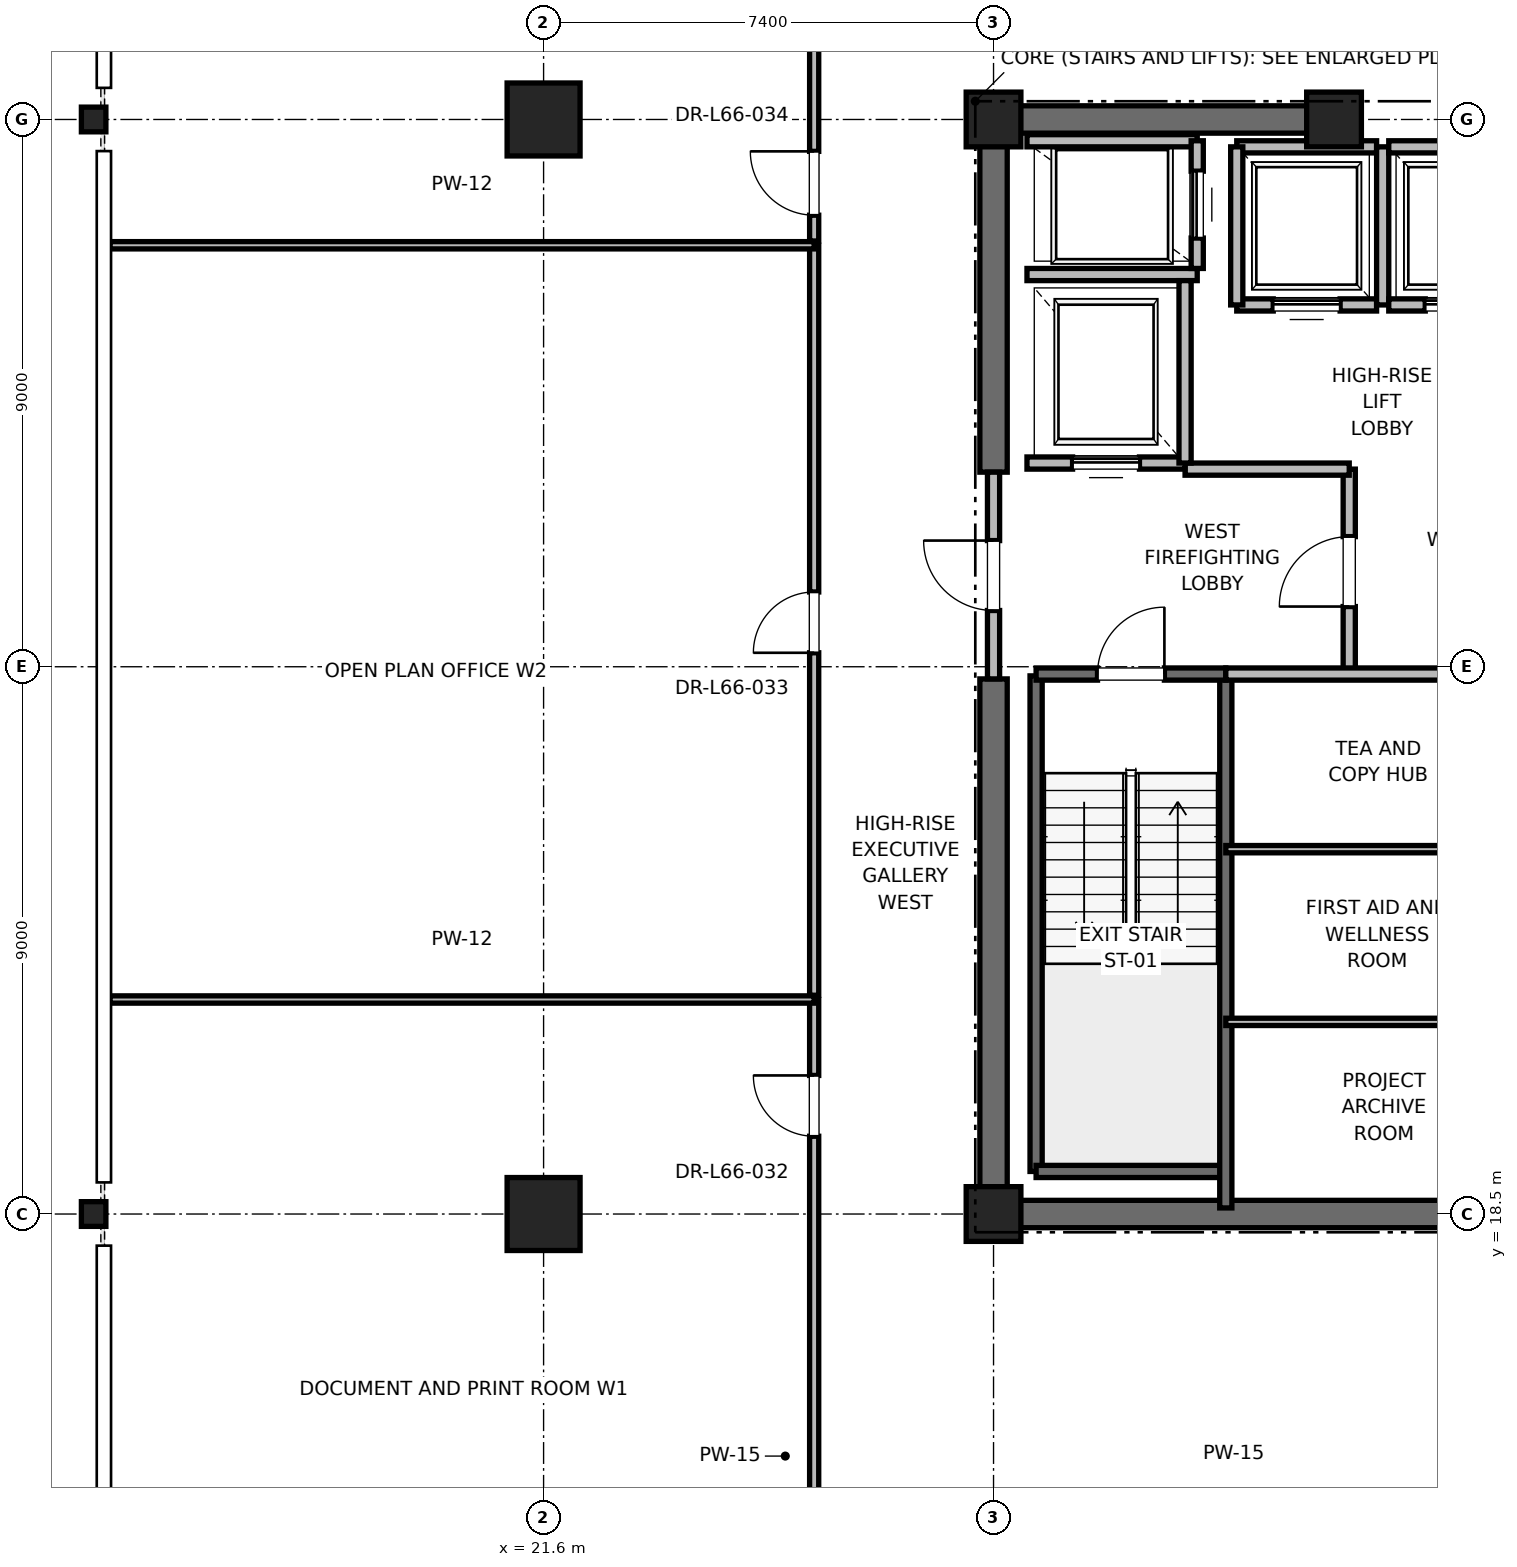
"""IFC4 building model, lengths in metres.
Left out: names, types, materials, properties, quantities, classifications, styles, units other than length and angle.
Written with IfcOpenShell. Run it as: python <this file> out.ifc"""

import sys

from ifc_helpers import new_model, si_unit, direction, frame, frame_2d, origin, origin_2d, place, context, subcontext, project, spatial, rectangle, i_section, extrude, element, fill, save


model = new_model("IFC4")
c1 = context("Model", 3, precision=1e-05, world=origin(), true_north=direction((0.0, 1.0)))
c2 = subcontext(c1, "Body", "Model", "MODEL_VIEW")
j1 = project(units=[si_unit("LENGTHUNIT", "METRE"), si_unit("PLANEANGLEUNIT", "RADIAN")], contexts=[c1])
p1 = place(None, origin())
s1 = spatial("IfcSite", under=j1, at=p1, CompositionType="ELEMENT")
p2 = place(p1, origin())
s2 = spatial("IfcBuilding", under=s1, at=p2, CompositionType="ELEMENT")
p3 = place(p2, frame((0.0, 0.0, 283.2)))
s3 = spatial("IfcBuildingStorey", under=s2, at=p3, CompositionType="ELEMENT", Elevation=283.2)
for number, where, z_axis, x_axis in (
    (1, (21.6, 18.5, 0.0), (0.0, 0.0, 1.0), (1.0, 0.0, 0.0)),
    (2, (21.6, 36.5, 0.0), (0.0, 0.0, 1.0), (1.0, 0.0, 0.0)),
):
    element("IfcColumn", number, at=place(p3, frame(where, z_axis=z_axis, x_axis=x_axis)), inside=s3, PredefinedType="COLUMN", context=c2, shape_type="SweptSolid", body=[
        extrude(rectangle(XDim=1.2, YDim=1.2, at=origin_2d()), origin(), (0.0, 0.0, 1.0), 4.0),
    ])
for number, where, z_axis, x_axis in (
    (3, (14.2, 18.5, 0.0), (0.0, 0.0, 1.0), (1.0, 0.0, 0.0)),
    (4, (14.2, 36.5, 0.0), (0.0, 0.0, 1.0), (1.0, 0.0, 0.0)),
):
    element("IfcColumn", number, at=place(p3, frame(where, z_axis=z_axis, x_axis=x_axis)), inside=s3, PredefinedType="COLUMN", context=c2, shape_type="SweptSolid", body=[
        extrude(i_section(OverallWidth=0.403, OverallDepth=0.406, WebThickness=0.027, FlangeThickness=0.043, FilletRadius=0.015, at=origin_2d()), origin(), (0.0, 0.0, 1.0), 4.0),
    ])
for number, where, z_axis, x_axis in (
    (5, (29.0, 18.5, 0.0), (0.0, 0.0, 1.0), (1.0, 0.0, 0.0)),
    (6, (29.0, 36.5, 0.0), (0.0, 0.0, 1.0), (1.0, 0.0, 0.0)),
    (7, (34.6, 36.5, 0.0), (0.0, 0.0, 1.0), (1.0, 0.0, 0.0)),
):
    element("IfcColumn", number, at=place(p3, frame(where, z_axis=z_axis, x_axis=x_axis)), inside=s3, PredefinedType="PILASTER", context=c2, shape_type="SweptSolid", body=[
        extrude(rectangle(XDim=0.9, YDim=0.9, at=origin_2d()), origin(), (0.0, 0.0, 1.0), 4.0),
    ])
p4 = place(p3, frame((29.0, 18.5, 0.0), z_axis=(0.0, 0.0, 1.0), x_axis=(1.0, 0.0, 0.0)))
e8 = element("IfcWall", 8, at=p4, inside=s3, PredefinedType="SHEAR", context=c2, shape_type="SweptSolid", body=[
    extrude(rectangle(XDim=9.2, YDim=0.45, at=frame_2d((4.6, 0.0))), origin(), (0.0, 0.0, 1.0), 3.785),
])
p5 = place(p3, frame((29.0, 36.5, 0.0), z_axis=(0.0, 0.0, 1.0), x_axis=(1.0, 0.0, 0.0)))
e9 = element("IfcWall", 9, at=p5, inside=s3, PredefinedType="SHEAR", context=c2, shape_type="SweptSolid", body=[
    extrude(rectangle(XDim=5.8, YDim=0.45, at=frame_2d((2.9, 0.0))), origin(), (0.0, 0.0, 1.0), 3.785),
])
p6 = place(p3, frame((29.0, 18.5, 0.0), z_axis=(0.0, 0.0, 1.0), x_axis=(0.0, 1.0, 0.0)))
e10 = element("IfcWall", 10, at=p6, inside=s3, PredefinedType="SHEAR", context=c2, shape_type="SweptSolid", body=[
    extrude(rectangle(XDim=8.8, YDim=0.45, at=frame_2d((4.4, 0.0))), origin(), (0.0, 0.0, 1.0), 3.785),
])
p7 = place(p3, frame((29.0, 30.7, 0.0), z_axis=(0.0, 0.0, 1.0), x_axis=(0.0, 1.0, 0.0)))
e11 = element("IfcWall", 11, at=p7, inside=s3, PredefinedType="SHEAR", context=c2, shape_type="SweptSolid", body=[
    extrude(rectangle(XDim=5.8, YDim=0.45, at=frame_2d((2.9, 0.0))), origin(), (0.0, 0.0, 1.0), 3.785),
])
p8 = place(p3, frame((29.7, 19.2, 0.0), z_axis=(0.0, 0.0, 1.0), x_axis=(0.0, 1.0, 0.0)))
e12 = element("IfcWall", 12, at=p8, inside=s3, PredefinedType="SOLIDWALL", context=c2, shape_type="SweptSolid", body=[
    extrude(rectangle(XDim=8.15, YDim=0.2, at=frame_2d((4.075, 0.0))), origin(), (0.0, 0.0, 1.0), 3.785),
])
p9 = place(p3, frame((29.7, 19.2, 0.0), z_axis=(0.0, 0.0, 1.0), x_axis=(1.0, 0.0, 0.0)))
e13 = element("IfcWall", 13, at=p9, inside=s3, PredefinedType="SOLIDWALL", context=c2, shape_type="SweptSolid", body=[
    extrude(rectangle(XDim=3.12, YDim=0.2, at=frame_2d((1.56, 0.0))), origin(), (0.0, 0.0, 1.0), 3.785),
])
p10 = place(p3, frame((32.82, 18.6, 0.0), z_axis=(0.0, 0.0, 1.0), x_axis=(0.0, 1.0, 0.0)))
e14 = element("IfcWall", 14, at=p10, inside=s3, PredefinedType="SOLIDWALL", context=c2, shape_type="SweptSolid", body=[
    extrude(rectangle(XDim=8.78, YDim=0.2, at=frame_2d((4.39, 0.0))), origin(), (0.0, 0.0, 1.0), 3.785),
])
p11 = place(p3, frame((29.7, 27.38, 0.0), z_axis=(0.0, 0.0, 1.0), x_axis=(1.0, 0.0, 0.0)))
e15 = element("IfcWall", 15, at=p11, inside=s3, PredefinedType="SOLIDWALL", context=c2, shape_type="SweptSolid", body=[
    extrude(rectangle(XDim=3.12, YDim=0.2, at=frame_2d((1.56, 0.0))), origin(), (0.0, 0.0, 1.0), 3.785),
])
p12 = place(p11, frame((1.01, 0.0, 0.0)))
e16 = element("IfcOpeningElement", 16, at=p12, cuts=e15, PredefinedType="OPENING", context=c2, shape_type="SweptSolid", body=[
    extrude(rectangle(XDim=1.1, YDim=2.15, at=frame_2d((0.55, 1.075))), frame((0.0, 0.1, 0.0), z_axis=(0.0, -1.0, 0.0), x_axis=(1.0, 0.0, 0.0)), (0.0, 0.0, 1.0), 0.2),
])
p13 = place(p3, frame((34.85, 27.38, 0.0), z_axis=(0.0, 0.0, 1.0), x_axis=(0.0, 1.0, 0.0)))
e17 = element("IfcWall", 17, at=p13, inside=s3, PredefinedType="PARTITIONING", context=c2, shape_type="SweptSolid", body=[
    extrude(rectangle(XDim=3.37, YDim=0.2, at=frame_2d((1.685, 0.0))), origin(), (0.0, 0.0, 1.0), 3.785),
])
p14 = place(p13, frame((1.11, 0.0, 0.0)))
e18 = element("IfcOpeningElement", 18, at=p14, cuts=e17, PredefinedType="OPENING", context=c2, shape_type="SweptSolid", body=[
    extrude(rectangle(XDim=1.15, YDim=2.2, at=frame_2d((0.575, 1.1))), frame((0.0, 0.1, 0.0), z_axis=(0.0, -1.0, 0.0), x_axis=(1.0, 0.0, 0.0)), (0.0, 0.0, 1.0), 0.2),
])
p15 = place(p3, frame((29.0, 27.3, 0.0), z_axis=(0.0, 0.0, 1.0), x_axis=(0.0, 1.0, 0.0)))
e19 = element("IfcWall", 19, at=p15, inside=s3, PredefinedType="PARTITIONING", context=c2, shape_type="SweptSolid", body=[
    extrude(rectangle(XDim=3.4, YDim=0.2, at=frame_2d((1.7, 0.0))), origin(), (0.0, 0.0, 1.0), 2.865),
])
p16 = place(p15, frame((1.125, 0.0, 0.0)))
e20 = element("IfcOpeningElement", 20, at=p16, cuts=e19, PredefinedType="OPENING", context=c2, shape_type="SweptSolid", body=[
    extrude(rectangle(XDim=1.15, YDim=2.2, at=frame_2d((0.575, 1.1))), frame((0.0, 0.1, 0.0), z_axis=(0.0, -1.0, 0.0), x_axis=(1.0, 0.0, 0.0)), (0.0, 0.0, 1.0), 0.2),
])
p17 = place(p3, frame((32.82, 27.38, 0.0), z_axis=(0.0, 0.0, 1.0), x_axis=(1.0, 0.0, 0.0)))
e21 = element("IfcWall", 21, at=p17, inside=s3, PredefinedType="PARTITIONING", context=c2, shape_type="SweptSolid", body=[
    extrude(rectangle(XDim=5.62, YDim=0.2, at=frame_2d((2.81, 0.0))), origin(), (0.0, 0.0, 1.0), 3.785),
])
p18 = place(p3, frame((32.15, 30.75, 0.0), z_axis=(0.0, 0.0, 1.0), x_axis=(1.0, 0.0, 0.0)))
e22 = element("IfcWall", 22, at=p18, inside=s3, PredefinedType="PARTITIONING", context=c2, shape_type="SweptSolid", body=[
    extrude(rectangle(XDim=2.7, YDim=0.2, at=frame_2d((1.35, 0.0))), origin(), (0.0, 0.0, 1.0), 3.785),
])
p19 = place(p3, frame((29.55, 30.85, 0.0), z_axis=(0.0, 0.0, 1.0), x_axis=(1.0, 0.0, 0.0)))
e23 = element("IfcWall", 23, at=p19, inside=s3, PredefinedType="SOLIDWALL", context=c2, shape_type="SweptSolid", body=[
    extrude(rectangle(XDim=2.6, YDim=0.2, at=frame_2d((1.3, 0.0))), origin(), (0.0, 0.0, 1.0), 2.865),
])
p20 = place(p19, frame((0.75, 0.0, 0.0)))
e24 = element("IfcOpeningElement", 24, at=p20, cuts=e23, PredefinedType="OPENING", context=c2, shape_type="SweptSolid", body=[
    extrude(rectangle(XDim=1.1, YDim=2.2, at=frame_2d((0.55, 1.1))), frame((0.0, 0.1, 0.0), z_axis=(0.0, -1.0, 0.0), x_axis=(1.0, 0.0, 0.0)), (0.0, 0.0, 1.0), 0.2),
])
p21 = place(p3, frame((29.55, 33.95, 0.0), z_axis=(0.0, 0.0, 1.0), x_axis=(1.0, 0.0, 0.0)))
e25 = element("IfcWall", 25, at=p21, inside=s3, PredefinedType="SOLIDWALL", context=c2, shape_type="SweptSolid", body=[
    extrude(rectangle(XDim=2.8, YDim=0.2, at=frame_2d((1.4, 0.0))), origin(), (0.0, 0.0, 1.0), 3.785),
])
p22 = place(p3, frame((32.15, 30.85, 0.0), z_axis=(0.0, 0.0, 1.0), x_axis=(0.0, 1.0, 0.0)))
e26 = element("IfcWall", 26, at=p22, inside=s3, PredefinedType="SOLIDWALL", context=c2, shape_type="SweptSolid", body=[
    extrude(rectangle(XDim=3.0, YDim=0.2, at=frame_2d((1.5, 0.0))), origin(), (0.0, 0.0, 1.0), 3.785),
])
p23 = place(p3, frame((32.35, 36.15, 0.0), z_axis=(0.0, 0.0, 1.0), x_axis=(-1.0, 0.0, 0.0)))
e27 = element("IfcWall", 27, at=p23, inside=s3, PredefinedType="SOLIDWALL", context=c2, shape_type="SweptSolid", body=[
    extrude(rectangle(XDim=2.8, YDim=0.2, at=frame_2d((1.4, 0.0))), origin(), (0.0, 0.0, 1.0), 3.148),
])
p24 = place(p3, frame((32.35, 34.05, 0.0), z_axis=(0.0, 0.0, 1.0), x_axis=(0.0, 1.0, 0.0)))
e28 = element("IfcWall", 28, at=p24, inside=s3, PredefinedType="SOLIDWALL", context=c2, shape_type="SweptSolid", body=[
    extrude(rectangle(XDim=2.1, YDim=0.2, at=frame_2d((1.05, 0.0))), origin(), (0.0, 0.0, 1.0), 3.785),
])
p25 = place(p24, frame((0.5, 0.0, 0.0)))
e29 = element("IfcOpeningElement", 29, at=p25, cuts=e28, PredefinedType="OPENING", context=c2, shape_type="SweptSolid", body=[
    extrude(rectangle(XDim=1.1, YDim=2.2, at=frame_2d((0.55, 1.1))), frame((0.0, 0.1, 0.0), z_axis=(0.0, -1.0, 0.0), x_axis=(1.0, 0.0, 0.0)), (0.0, 0.0, 1.0), 0.2),
])
p26 = place(p3, frame((33.0, 33.45, 0.0), z_axis=(0.0, 0.0, 1.0), x_axis=(1.0, 0.0, 0.0)))
e30 = element("IfcWall", 30, at=p26, inside=s3, PredefinedType="SOLIDWALL", context=c2, shape_type="SweptSolid", body=[
    extrude(rectangle(XDim=2.3, YDim=0.2, at=frame_2d((1.15, 0.0))), origin(), (0.0, 0.0, 1.0), 3.785),
])
p27 = place(p26, frame((0.6, 0.0, 0.0)))
e31 = element("IfcOpeningElement", 31, at=p27, cuts=e30, PredefinedType="OPENING", context=c2, shape_type="SweptSolid", body=[
    extrude(rectangle(XDim=1.1, YDim=2.2, at=frame_2d((0.55, 1.1))), frame((0.0, 0.1, 0.0), z_axis=(0.0, -1.0, 0.0), x_axis=(1.0, 0.0, 0.0)), (0.0, 0.0, 1.0), 0.2),
])
p28 = place(p3, frame((35.3, 36.05, 0.0), z_axis=(0.0, 0.0, 1.0), x_axis=(-1.0, 0.0, 0.0)))
e32 = element("IfcWall", 32, at=p28, inside=s3, PredefinedType="SOLIDWALL", context=c2, shape_type="SweptSolid", body=[
    extrude(rectangle(XDim=2.3, YDim=0.2, at=frame_2d((1.15, 0.0))), origin(), (0.0, 0.0, 1.0), 2.865),
])
p29 = place(p3, frame((33.0, 36.05, 0.0), z_axis=(0.0, 0.0, 1.0), x_axis=(0.0, -1.0, 0.0)))
e33 = element("IfcWall", 33, at=p29, inside=s3, PredefinedType="SOLIDWALL", context=c2, shape_type="SweptSolid", body=[
    extrude(rectangle(XDim=2.6, YDim=0.2, at=frame_2d((1.3, 0.0))), origin(), (0.0, 0.0, 1.0), 3.785),
])
p30 = place(p3, frame((35.4, 33.45, 0.0), z_axis=(0.0, 0.0, 1.0), x_axis=(0.0, 1.0, 0.0)))
e34 = element("IfcWall", 34, at=p30, inside=s3, PredefinedType="SOLIDWALL", context=c2, shape_type="SweptSolid", body=[
    extrude(rectangle(XDim=2.6, YDim=0.2, at=frame_2d((1.3, 0.0))), origin(), (0.0, 0.0, 1.0), 2.865),
])
p31 = place(p3, frame((35.5, 33.45, 0.0), z_axis=(0.0, 0.0, 1.0), x_axis=(1.0, 0.0, 0.0)))
e35 = element("IfcWall", 35, at=p31, inside=s3, PredefinedType="SOLIDWALL", context=c2, shape_type="SweptSolid", body=[
    extrude(rectangle(XDim=2.3, YDim=0.2, at=frame_2d((1.15, 0.0))), origin(), (0.0, 0.0, 1.0), 3.785),
])
p32 = place(p31, frame((0.6, 0.0, 0.0)))
e36 = element("IfcOpeningElement", 36, at=p32, cuts=e35, PredefinedType="OPENING", context=c2, shape_type="SweptSolid", body=[
    extrude(rectangle(XDim=1.1, YDim=2.2, at=frame_2d((0.55, 1.1))), frame((0.0, 0.1, 0.0), z_axis=(0.0, -1.0, 0.0), x_axis=(1.0, 0.0, 0.0)), (0.0, 0.0, 1.0), 0.2),
])
p33 = place(p3, frame((37.8, 36.05, 0.0), z_axis=(0.0, 0.0, 1.0), x_axis=(-1.0, 0.0, 0.0)))
e37 = element("IfcWall", 37, at=p33, inside=s3, PredefinedType="SOLIDWALL", context=c2, shape_type="SweptSolid", body=[
    extrude(rectangle(XDim=2.3, YDim=0.2, at=frame_2d((1.15, 0.0))), origin(), (0.0, 0.0, 1.0), 2.865),
])
for number, where, z_axis, x_axis in (
    (38, (32.82, 21.66, 0.0), (0.0, 0.0, 1.0), (1.0, 0.0, 0.0)),
    (39, (32.82, 24.5, 0.0), (0.0, 0.0, 1.0), (1.0, 0.0, 0.0)),
):
    element("IfcWall", number, at=place(p3, frame(where, z_axis=z_axis, x_axis=x_axis)), inside=s3, PredefinedType="PARTITIONING", context=c2, shape_type="SweptSolid", body=[
        extrude(rectangle(XDim=5.23, YDim=0.12, at=frame_2d((2.615, 0.0))), origin(), (0.0, 0.0, 1.0), 2.85),
    ])
p34 = place(p3, frame((26.05, 9.26, 0.0), z_axis=(0.0, 0.0, 1.0), x_axis=(0.0, 1.0, 0.0)))
e40 = element("IfcWall", 40, at=p34, inside=s3, PredefinedType="PARTITIONING", context=c2, shape_type="SweptSolid", body=[
    extrude(rectangle(XDim=12.768, YDim=0.15, at=frame_2d((6.384, 0.0))), origin(), (0.0, 0.0, 1.0), 2.85),
])
p35 = place(p34, frame((10.519, 0.0, 0.0)))
e41 = element("IfcOpeningElement", 41, at=p35, cuts=e40, PredefinedType="OPENING", context=c2, shape_type="SweptSolid", body=[
    extrude(rectangle(XDim=1.0, YDim=2.15, at=frame_2d((0.5, 1.075))), frame((0.0, 0.075, 0.0), z_axis=(0.0, -1.0, 0.0), x_axis=(1.0, 0.0, 0.0)), (0.0, 0.0, 1.0), 0.15),
])
p36 = place(p3, frame((14.469, 22.028, 0.0), z_axis=(0.0, 0.0, 1.0), x_axis=(1.0, 0.0, 0.0)))
e42 = element("IfcWall", 42, at=p36, inside=s3, PredefinedType="PARTITIONING", context=c2, shape_type="SweptSolid", body=[
    extrude(rectangle(XDim=11.581, YDim=0.12, at=frame_2d((5.791, 0.0))), origin(), (0.0, 0.0, 1.0), 2.85),
])
p37 = place(p3, frame((26.05, 22.098, 0.0), z_axis=(0.0, 0.0, 1.0), x_axis=(0.0, 1.0, 0.0)))
e43 = element("IfcWall", 43, at=p37, inside=s3, PredefinedType="PARTITIONING", context=c2, shape_type="SweptSolid", body=[
    extrude(rectangle(XDim=12.333, YDim=0.15, at=frame_2d((6.167, 0.0))), origin(), (0.0, 0.0, 1.0), 2.85),
])
p38 = place(p37, frame((5.632, 0.0, 0.0)))
e44 = element("IfcOpeningElement", 44, at=p38, cuts=e43, PredefinedType="OPENING", context=c2, shape_type="SweptSolid", body=[
    extrude(rectangle(XDim=1.0, YDim=2.15, at=frame_2d((0.5, 1.075))), frame((0.0, 0.075, 0.0), z_axis=(0.0, -1.0, 0.0), x_axis=(1.0, 0.0, 0.0)), (0.0, 0.0, 1.0), 0.15),
])
p39 = place(p3, frame((14.469, 34.431, 0.0), z_axis=(0.0, 0.0, 1.0), x_axis=(1.0, 0.0, 0.0)))
e45 = element("IfcWall", 45, at=p39, inside=s3, PredefinedType="PARTITIONING", context=c2, shape_type="SweptSolid", body=[
    extrude(rectangle(XDim=11.581, YDim=0.12, at=frame_2d((5.791, 0.0))), origin(), (0.0, 0.0, 1.0), 2.85),
])
p40 = place(p3, frame((26.05, 34.501, 0.0), z_axis=(0.0, 0.0, 1.0), x_axis=(0.0, 1.0, 0.0)))
e46 = element("IfcWall", 46, at=p40, inside=s3, PredefinedType="PARTITIONING", context=c2, shape_type="SweptSolid", body=[
    extrude(rectangle(XDim=11.239, YDim=0.15, at=frame_2d((5.62, 0.0))), origin(), (0.0, 0.0, 1.0), 2.85),
])
p41 = place(p40, frame((0.424, 0.0, 0.0)))
e47 = element("IfcOpeningElement", 47, at=p41, cuts=e46, PredefinedType="OPENING", context=c2, shape_type="SweptSolid", body=[
    extrude(rectangle(XDim=1.05, YDim=2.2, at=frame_2d((0.525, 1.1))), frame((0.0, 0.075, 0.0), z_axis=(0.0, -1.0, 0.0), x_axis=(1.0, 0.0, 0.0)), (0.0, 0.0, 1.0), 0.15),
])
p42 = place(p12, origin())
e48 = element("IfcDoor", 48, at=p42, inside=s3, OperationType="SINGLE_SWING_RIGHT", PredefinedType="DOOR", context=c2, shape_type="SweptSolid", body=[
    extrude(rectangle(XDim=1.1, YDim=2.15, at=frame_2d((0.55, 1.075))), frame((0.0, 0.025, 0.0), z_axis=(0.0, -1.0, 0.0), x_axis=(1.0, 0.0, 0.0)), (0.0, 0.0, 1.0), 0.05),
])
fill(e16, e48)
p43 = place(p14, origin())
e49 = element("IfcDoor", 49, at=p43, inside=s3, OperationType="SINGLE_SWING_LEFT", PredefinedType="DOOR", context=c2, shape_type="SweptSolid", body=[
    extrude(rectangle(XDim=1.15, YDim=2.2, at=frame_2d((0.575, 1.1))), frame((0.0, 0.025, 0.0), z_axis=(0.0, -1.0, 0.0), x_axis=(1.0, 0.0, 0.0)), (0.0, 0.0, 1.0), 0.05),
])
fill(e18, e49)
p44 = place(p16, origin())
e50 = element("IfcDoor", 50, at=p44, inside=s3, OperationType="SINGLE_SWING_RIGHT", PredefinedType="DOOR", context=c2, shape_type="SweptSolid", body=[
    extrude(rectangle(XDim=1.15, YDim=2.2, at=frame_2d((0.575, 1.1))), frame((0.0, 0.025, 0.0), z_axis=(0.0, -1.0, 0.0), x_axis=(1.0, 0.0, 0.0)), (0.0, 0.0, 1.0), 0.05),
])
fill(e20, e50)
p45 = place(p20, origin())
e51 = element("IfcDoor", 51, at=p45, inside=s3, OperationType="SLIDING_TO_RIGHT", PredefinedType="DOOR", context=c2, shape_type="SweptSolid", body=[
    extrude(rectangle(XDim=1.1, YDim=2.2, at=frame_2d((0.55, 1.1))), frame((0.0, 0.025, 0.0), z_axis=(0.0, -1.0, 0.0), x_axis=(1.0, 0.0, 0.0)), (0.0, 0.0, 1.0), 0.05),
])
fill(e24, e51)
p46 = place(p25, origin())
e52 = element("IfcDoor", 52, at=p46, inside=s3, OperationType="SLIDING_TO_RIGHT", PredefinedType="DOOR", context=c2, shape_type="SweptSolid", body=[
    extrude(rectangle(XDim=1.1, YDim=2.2, at=frame_2d((0.55, 1.1))), frame((0.0, 0.025, 0.0), z_axis=(0.0, -1.0, 0.0), x_axis=(1.0, 0.0, 0.0)), (0.0, 0.0, 1.0), 0.05),
])
fill(e29, e52)
p47 = place(p27, origin())
e53 = element("IfcDoor", 53, at=p47, inside=s3, OperationType="SLIDING_TO_RIGHT", PredefinedType="DOOR", context=c2, shape_type="SweptSolid", body=[
    extrude(rectangle(XDim=1.1, YDim=2.2, at=frame_2d((0.55, 1.1))), frame((0.0, 0.025, 0.0), z_axis=(0.0, -1.0, 0.0), x_axis=(1.0, 0.0, 0.0)), (0.0, 0.0, 1.0), 0.05),
])
fill(e31, e53)
p48 = place(p32, origin())
e54 = element("IfcDoor", 54, at=p48, inside=s3, OperationType="SLIDING_TO_RIGHT", PredefinedType="DOOR", context=c2, shape_type="SweptSolid", body=[
    extrude(rectangle(XDim=1.1, YDim=2.2, at=frame_2d((0.55, 1.1))), frame((0.0, 0.025, 0.0), z_axis=(0.0, -1.0, 0.0), x_axis=(1.0, 0.0, 0.0)), (0.0, 0.0, 1.0), 0.05),
])
fill(e36, e54)
p49 = place(p35, origin())
e55 = element("IfcDoor", 55, at=p49, inside=s3, OperationType="SINGLE_SWING_RIGHT", PredefinedType="DOOR", context=c2, shape_type="SweptSolid", body=[
    extrude(rectangle(XDim=1.0, YDim=2.15, at=frame_2d((0.5, 1.075))), frame((0.0, 0.025, 0.0), z_axis=(0.0, -1.0, 0.0), x_axis=(1.0, 0.0, 0.0)), (0.0, 0.0, 1.0), 0.05),
])
fill(e41, e55)
p50 = place(p38, origin())
e56 = element("IfcDoor", 56, at=p50, inside=s3, OperationType="SINGLE_SWING_LEFT", PredefinedType="DOOR", context=c2, shape_type="SweptSolid", body=[
    extrude(rectangle(XDim=1.0, YDim=2.15, at=frame_2d((0.5, 1.075))), frame((0.0, 0.025, 0.0), z_axis=(0.0, -1.0, 0.0), x_axis=(1.0, 0.0, 0.0)), (0.0, 0.0, 1.0), 0.05),
])
fill(e44, e56)
p51 = place(p41, origin())
e57 = element("IfcDoor", 57, at=p51, inside=s3, OperationType="SINGLE_SWING_RIGHT", PredefinedType="DOOR", context=c2, shape_type="SweptSolid", body=[
    extrude(rectangle(XDim=1.05, YDim=2.2, at=frame_2d((0.525, 1.1))), frame((0.0, 0.025, 0.0), z_axis=(0.0, -1.0, 0.0), x_axis=(1.0, 0.0, 0.0)), (0.0, 0.0, 1.0), 0.05),
])
fill(e47, e57)
save(model, sys.argv[1])
